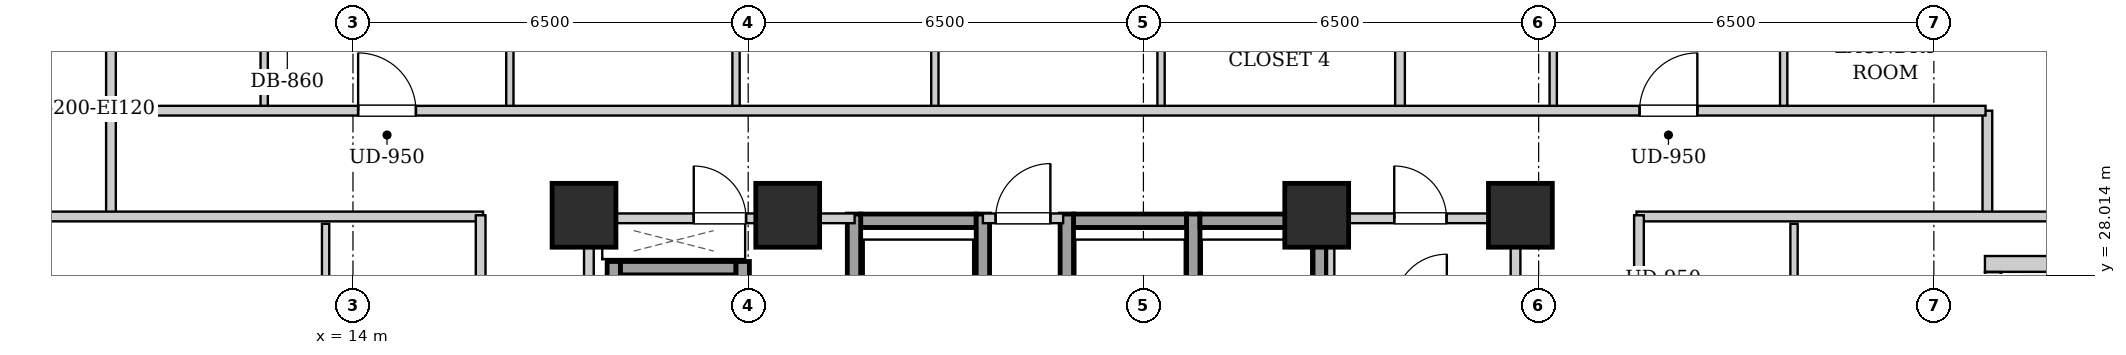
"""IFC4 building model, lengths in metres.
Left out: names, types, materials, properties, quantities, classifications, styles, units other than length and angle.
Written with IfcOpenShell. Run it as: python <this file> out.ifc"""

import sys

from ifc_helpers import new_model, si_unit, direction, frame, frame_2d, origin, origin_2d, place, context, subcontext, project, spatial, rectangle, extrude, element, fill, save


model = new_model("IFC4")
c1 = context("Model", 3, precision=1e-05, world=origin(), true_north=direction((0.0, 1.0)))
c2 = subcontext(c1, "Body", "Model", "MODEL_VIEW")
j1 = project(units=[si_unit("LENGTHUNIT", "METRE"), si_unit("PLANEANGLEUNIT", "RADIAN")], contexts=[c1])
p1 = place(None, origin())
s1 = spatial("IfcSite", under=j1, at=p1, CompositionType="ELEMENT")
p2 = place(p1, origin())
s2 = spatial("IfcBuilding", under=s1, at=p2, CompositionType="ELEMENT")
p3 = place(p2, frame((0.0, 0.0, 116.7)))
s3 = spatial("IfcBuildingStorey", under=s2, at=p3, CompositionType="ELEMENT", Elevation=116.7)
for number, where, z_axis, x_axis in (
    (1, (17.8, 29.0, 0.0), (0.0, 0.0, 1.0), (1.0, 0.0, 0.0)),
    (2, (21.15, 29.0, 0.0), (0.0, 0.0, 1.0), (1.0, 0.0, 0.0)),
    (3, (29.85, 29.0, 0.0), (0.0, 0.0, 1.0), (1.0, 0.0, 0.0)),
    (4, (33.2, 29.0, 0.0), (0.0, 0.0, 1.0), (1.0, 0.0, 0.0)),
):
    element("IfcColumn", number, at=place(p3, frame(where, z_axis=z_axis, x_axis=x_axis)), inside=s3, PredefinedType="COLUMN", context=c2, shape_type="SweptSolid", body=[
        extrude(rectangle(XDim=1.05, YDim=1.05, at=origin_2d()), origin(), (0.0, 0.0, 1.0), 3.2),
    ])
p4 = place(p3, frame((43.24, 28.2, 0.0), z_axis=(0.0, 0.0, 1.0), x_axis=(-1.0, 0.0, 0.0)))
e5 = element("IfcWall", 5, at=p4, inside=s3, PredefinedType="SOLIDWALL", context=c2, shape_type="SweptSolid", body=[
    extrude(rectangle(XDim=2.4, YDim=0.26, at=frame_2d((1.2, 0.0))), origin(), (0.0, 0.0, 1.0), 2.88),
])
p5 = place(p3, frame((40.97, 28.066, 0.0), z_axis=(0.0, 0.0, 1.0), x_axis=(0.0, -1.0, 0.0)))
e6 = element("IfcWall", 6, at=p5, inside=s3, PredefinedType="SOLIDWALL", context=c2, shape_type="SweptSolid", body=[
    extrude(rectangle(XDim=3.332, YDim=0.26, at=frame_2d((1.666, 0.0))), origin(), (0.0, 0.0, 1.0), 2.88),
])
p6 = place(p5, frame((1.116, 0.0, 0.0)))
e7 = element("IfcOpeningElement", 7, at=p6, cuts=e6, PredefinedType="OPENING", context=c2, shape_type="SweptSolid", body=[
    extrude(rectangle(XDim=1.1, YDim=2.0, at=frame_2d((0.55, 1.0))), frame((0.0, 0.14, 0.0), z_axis=(0.0, -1.0, 0.0), x_axis=(1.0, 0.0, 0.0)), (0.0, 0.0, 1.0), 0.28),
])
p7 = place(p5, frame((0.276, 0.0, 0.55)))
e8 = element("IfcOpeningElement", 8, at=p7, cuts=e6, PredefinedType="OPENING", context=c2, shape_type="SweptSolid", body=[
    extrude(rectangle(XDim=0.68, YDim=1.2, at=frame_2d((0.34, 0.6))), frame((0.0, 0.14, 0.0), z_axis=(0.0, -1.0, 0.0), x_axis=(1.0, 0.0, 0.0)), (0.0, 0.0, 1.0), 0.28),
])
p8 = place(p3, frame((22.35, 28.91, 0.0), z_axis=(0.0, 0.0, 1.0), x_axis=(1.0, 0.0, 0.0)))
e9 = element("IfcWall", 9, at=p8, inside=s3, PredefinedType="SHEAR", context=c2, shape_type="SweptSolid", body=[
    extrude(rectangle(XDim=1.9, YDim=0.22, at=frame_2d((0.95, 0.0))), origin(), (0.0, 0.0, 1.0), 2.88),
])
for number, where, z_axis, x_axis in (
    (10, (22.24, 26.58, 0.0), (0.0, 0.0, 1.0), (0.0, 1.0, 0.0)),
    (11, (24.36, 26.58, 0.0), (0.0, 0.0, 1.0), (0.0, 1.0, 0.0)),
):
    element("IfcWall", number, at=place(p3, frame(where, z_axis=z_axis, x_axis=x_axis)), inside=s3, PredefinedType="SHEAR", context=c2, shape_type="SweptSolid", body=[
        extrude(rectangle(XDim=2.44, YDim=0.22, at=frame_2d((1.22, 0.0))), origin(), (0.0, 0.0, 1.0), 2.88),
    ])
p9 = place(p3, frame((25.85, 28.91, 0.0), z_axis=(0.0, 0.0, 1.0), x_axis=(1.0, 0.0, 0.0)))
e12 = element("IfcWall", 12, at=p9, inside=s3, PredefinedType="SHEAR", context=c2, shape_type="SweptSolid", body=[
    extrude(rectangle(XDim=1.86, YDim=0.22, at=frame_2d((0.93, 0.0))), origin(), (0.0, 0.0, 1.0), 2.88),
])
for number, where, z_axis, x_axis in (
    (13, (25.74, 26.58, 0.0), (0.0, 0.0, 1.0), (0.0, 1.0, 0.0)),
    (14, (27.82, 26.58, 0.0), (0.0, 0.0, 1.0), (0.0, 1.0, 0.0)),
):
    element("IfcWall", number, at=place(p3, frame(where, z_axis=z_axis, x_axis=x_axis)), inside=s3, PredefinedType="SHEAR", context=c2, shape_type="SweptSolid", body=[
        extrude(rectangle(XDim=2.44, YDim=0.22, at=frame_2d((1.22, 0.0))), origin(), (0.0, 0.0, 1.0), 2.88),
    ])
p10 = place(p3, frame((27.93, 28.91, 0.0), z_axis=(0.0, 0.0, 1.0), x_axis=(1.0, 0.0, 0.0)))
e15 = element("IfcWall", 15, at=p10, inside=s3, PredefinedType="SHEAR", context=c2, shape_type="SweptSolid", body=[
    extrude(rectangle(XDim=1.86, YDim=0.22, at=frame_2d((0.93, 0.0))), origin(), (0.0, 0.0, 1.0), 2.88),
])
p11 = place(p3, frame((29.9, 26.58, 0.0), z_axis=(0.0, 0.0, 1.0), x_axis=(0.0, 1.0, 0.0)))
e16 = element("IfcWall", 16, at=p11, inside=s3, PredefinedType="SHEAR", context=c2, shape_type="SweptSolid", body=[
    extrude(rectangle(XDim=2.44, YDim=0.22, at=frame_2d((1.22, 0.0))), origin(), (0.0, 0.0, 1.0), 2.88),
])
p12 = place(p3, frame((18.29, 24.1, 0.0), z_axis=(0.0, 0.0, 1.0), x_axis=(0.0, 1.0, 0.0)))
e17 = element("IfcWall", 17, at=p12, inside=s3, PredefinedType="SHEAR", context=c2, shape_type="SweptSolid", body=[
    extrude(rectangle(XDim=4.14, YDim=0.22, at=frame_2d((2.07, 0.0))), origin(), (0.0, 0.0, 1.0), 2.88),
])
p13 = place(p3, frame((18.4, 28.13, 0.0), z_axis=(0.0, 0.0, 1.0), x_axis=(1.0, 0.0, 0.0)))
e18 = element("IfcWall", 18, at=p13, inside=s3, PredefinedType="SHEAR", context=c2, shape_type="SweptSolid", body=[
    extrude(rectangle(XDim=1.9, YDim=0.22, at=frame_2d((0.95, 0.0))), origin(), (0.0, 0.0, 1.0), 2.88),
])
p14 = place(p3, frame((20.41, 26.06, 0.0), z_axis=(0.0, 0.0, 1.0), x_axis=(0.0, 1.0, 0.0)))
e19 = element("IfcWall", 19, at=p14, inside=s3, PredefinedType="SHEAR", context=c2, shape_type="SweptSolid", body=[
    extrude(rectangle(XDim=2.18, YDim=0.22, at=frame_2d((1.09, 0.0))), origin(), (0.0, 0.0, 1.0), 2.88),
])
for number, where, z_axis, x_axis in (
    (20, (17.88, 24.12, 0.0), (0.0, 0.0, 1.0), (0.0, 1.0, 0.0)),
    (21, (33.12, 24.12, 0.0), (0.0, 0.0, 1.0), (0.0, 1.0, 0.0)),
):
    element("IfcWall", number, at=place(p3, frame(where, z_axis=z_axis, x_axis=x_axis)), inside=s3, PredefinedType="PARTITIONING", context=c2, shape_type="SweptSolid", body=[
        extrude(rectangle(XDim=4.76, YDim=0.16, at=frame_2d((2.38, 0.0))), origin(), (0.0, 0.0, 1.0), 2.215),
    ])
p15 = place(p3, frame((24.36, 28.95, 0.0), z_axis=(0.0, 0.0, 1.0), x_axis=(1.0, 0.0, 0.0)))
e22 = element("IfcWall", 22, at=p15, inside=s3, PredefinedType="PARTITIONING", context=c2, shape_type="SweptSolid", body=[
    extrude(rectangle(XDim=1.32, YDim=0.16, at=frame_2d((0.66, 0.0))), origin(), (0.0, 0.0, 1.0), 2.253),
])
p16 = place(p15, frame((0.21, 0.0, 0.0)))
e23 = element("IfcOpeningElement", 23, at=p16, cuts=e22, PredefinedType="OPENING", context=c2, shape_type="SweptSolid", body=[
    extrude(rectangle(XDim=0.9, YDim=2.05, at=frame_2d((0.45, 1.025))), frame((0.0, 0.09, 0.0), z_axis=(0.0, -1.0, 0.0), x_axis=(1.0, 0.0, 0.0)), (0.0, 0.0, 1.0), 0.18),
])
p17 = place(p3, frame((17.96, 28.95, 0.0), z_axis=(0.0, 0.0, 1.0), x_axis=(1.0, 0.0, 0.0)))
e24 = element("IfcWall", 24, at=p17, inside=s3, PredefinedType="PARTITIONING", context=c2, shape_type="SweptSolid", body=[
    extrude(rectangle(XDim=4.29, YDim=0.16, at=frame_2d((2.145, 0.0))), origin(), (0.0, 0.0, 1.0), 2.253),
])
p18 = place(p17, frame((1.645, 0.0, 0.0)))
e25 = element("IfcOpeningElement", 25, at=p18, cuts=e24, PredefinedType="OPENING", context=c2, shape_type="SweptSolid", body=[
    extrude(rectangle(XDim=0.86, YDim=2.05, at=frame_2d((0.43, 1.025))), frame((0.0, 0.09, 0.0), z_axis=(0.0, -1.0, 0.0), x_axis=(1.0, 0.0, 0.0)), (0.0, 0.0, 1.0), 0.18),
])
p19 = place(p3, frame((30.08, 26.18, 0.0), z_axis=(0.0, 0.0, 1.0), x_axis=(0.0, 1.0, 0.0)))
e26 = element("IfcWall", 26, at=p19, inside=s3, PredefinedType="PARTITIONING", context=c2, shape_type="SweptSolid", body=[
    extrude(rectangle(XDim=2.68, YDim=0.12, at=frame_2d((1.34, 0.0))), origin(), (0.0, 0.0, 1.0), 2.88),
])
p20 = place(p3, frame((30.08, 28.95, 0.0), z_axis=(0.0, 0.0, 1.0), x_axis=(1.0, 0.0, 0.0)))
e27 = element("IfcWall", 27, at=p20, inside=s3, PredefinedType="PARTITIONING", context=c2, shape_type="SweptSolid", body=[
    extrude(rectangle(XDim=2.96, YDim=0.16, at=frame_2d((1.48, 0.0))), origin(), (0.0, 0.0, 1.0), 2.88),
])
p21 = place(p20, frame((1.045, 0.0, 0.0)))
e28 = element("IfcOpeningElement", 28, at=p21, cuts=e27, PredefinedType="OPENING", context=c2, shape_type="SweptSolid", body=[
    extrude(rectangle(XDim=0.86, YDim=2.05, at=frame_2d((0.43, 1.025))), frame((0.0, 0.09, 0.0), z_axis=(0.0, -1.0, 0.0), x_axis=(1.0, 0.0, 0.0)), (0.0, 0.0, 1.0), 0.18),
])
for number, where, z_axis, x_axis in (
    (29, (10.02, 28.98, 0.0), (0.0, 0.0, 1.0), (0.0, 1.0, 0.0)),
    (30, (40.88, 28.98, 0.0), (0.0, 0.0, 1.0), (0.0, 1.0, 0.0)),
):
    element("IfcWall", number, at=place(p3, frame(where, z_axis=z_axis, x_axis=x_axis)), inside=s3, PredefinedType="PARTITIONING", context=c2, shape_type="SweptSolid", body=[
        extrude(rectangle(XDim=1.74, YDim=0.16, at=frame_2d((0.87, 0.0))), origin(), (0.0, 0.0, 1.0), 2.88),
    ])
p22 = place(p3, frame((7.78, 28.98, 0.0), z_axis=(0.0, 0.0, 1.0), x_axis=(1.0, 0.0, 0.0)))
e31 = element("IfcWall", 31, at=p22, inside=s3, PredefinedType="PARTITIONING", context=c2, shape_type="SweptSolid", body=[
    extrude(rectangle(XDim=8.36, YDim=0.16, at=frame_2d((4.18, 0.0))), origin(), (0.0, 0.0, 1.0), 2.253),
])
p23 = place(p3, frame((35.11, 28.98, 0.0), z_axis=(0.0, 0.0, 1.0), x_axis=(1.0, 0.0, 0.0)))
e32 = element("IfcWall", 32, at=p23, inside=s3, PredefinedType="PARTITIONING", context=c2, shape_type="SweptSolid", body=[
    extrude(rectangle(XDim=8.01, YDim=0.16, at=frame_2d((4.005, 0.0))), origin(), (0.0, 0.0, 1.0), 2.253),
])
p24 = place(p3, frame((10.02, 30.76, 0.0), z_axis=(0.0, 0.0, 1.0), x_axis=(0.0, 1.0, 0.0)))
e33 = element("IfcWall", 33, at=p24, inside=s3, PredefinedType="PARTITIONING", context=c2, shape_type="SweptSolid", body=[
    extrude(rectangle(XDim=2.91, YDim=0.16, at=frame_2d((1.455, 0.0))), origin(), (0.0, 0.0, 1.0), 2.88),
])
p25 = place(p3, frame((12.54, 30.76, 0.0), z_axis=(0.0, 0.0, 1.0), x_axis=(0.0, 1.0, 0.0)))
e34 = element("IfcWall", 34, at=p25, inside=s3, PredefinedType="PARTITIONING", context=c2, shape_type="SweptSolid", body=[
    extrude(rectangle(XDim=2.85, YDim=0.12, at=frame_2d((1.425, 0.0))), origin(), (0.0, 0.0, 1.0), 2.88),
])
p26 = place(p25, frame((0.995, 0.0, 0.0)))
e35 = element("IfcOpeningElement", 35, at=p26, cuts=e34, PredefinedType="OPENING", context=c2, shape_type="SweptSolid", body=[
    extrude(rectangle(XDim=0.86, YDim=2.05, at=frame_2d((0.43, 1.025))), frame((0.0, 0.07, 0.0), z_axis=(0.0, -1.0, 0.0), x_axis=(1.0, 0.0, 0.0)), (0.0, 0.0, 1.0), 0.14),
])
p27 = place(p3, frame((16.58, 30.76, 0.0), z_axis=(0.0, 0.0, 1.0), x_axis=(0.0, 1.0, 0.0)))
e36 = element("IfcWall", 36, at=p27, inside=s3, PredefinedType="PARTITIONING", context=c2, shape_type="SweptSolid", body=[
    extrude(rectangle(XDim=2.85, YDim=0.12, at=frame_2d((1.425, 0.0))), origin(), (0.0, 0.0, 1.0), 2.88),
])
p28 = place(p27, frame((0.975, 0.0, 0.0)))
e37 = element("IfcOpeningElement", 37, at=p28, cuts=e36, PredefinedType="OPENING", context=c2, shape_type="SweptSolid", body=[
    extrude(rectangle(XDim=0.9, YDim=2.05, at=frame_2d((0.45, 1.025))), frame((0.0, 0.07, 0.0), z_axis=(0.0, -1.0, 0.0), x_axis=(1.0, 0.0, 0.0)), (0.0, 0.0, 1.0), 0.14),
])
p29 = place(p3, frame((20.3, 30.76, 0.0), z_axis=(0.0, 0.0, 1.0), x_axis=(0.0, 1.0, 0.0)))
e38 = element("IfcWall", 38, at=p29, inside=s3, PredefinedType="PARTITIONING", context=c2, shape_type="SweptSolid", body=[
    extrude(rectangle(XDim=2.85, YDim=0.12, at=frame_2d((1.425, 0.0))), origin(), (0.0, 0.0, 1.0), 2.88),
])
p30 = place(p29, frame((0.975, 0.0, 0.0)))
e39 = element("IfcOpeningElement", 39, at=p30, cuts=e38, PredefinedType="OPENING", context=c2, shape_type="SweptSolid", body=[
    extrude(rectangle(XDim=0.9, YDim=2.05, at=frame_2d((0.45, 1.025))), frame((0.0, 0.07, 0.0), z_axis=(0.0, -1.0, 0.0), x_axis=(1.0, 0.0, 0.0)), (0.0, 0.0, 1.0), 0.14),
])
p31 = place(p3, frame((23.57, 30.76, 0.0), z_axis=(0.0, 0.0, 1.0), x_axis=(0.0, 1.0, 0.0)))
e40 = element("IfcWall", 40, at=p31, inside=s3, PredefinedType="PARTITIONING", context=c2, shape_type="SweptSolid", body=[
    extrude(rectangle(XDim=2.85, YDim=0.12, at=frame_2d((1.425, 0.0))), origin(), (0.0, 0.0, 1.0), 2.88),
])
p32 = place(p31, frame((0.975, 0.0, 0.0)))
e41 = element("IfcOpeningElement", 41, at=p32, cuts=e40, PredefinedType="OPENING", context=c2, shape_type="SweptSolid", body=[
    extrude(rectangle(XDim=0.9, YDim=2.05, at=frame_2d((0.45, 1.025))), frame((0.0, 0.07, 0.0), z_axis=(0.0, -1.0, 0.0), x_axis=(1.0, 0.0, 0.0)), (0.0, 0.0, 1.0), 0.14),
])
p33 = place(p3, frame((27.29, 30.76, 0.0), z_axis=(0.0, 0.0, 1.0), x_axis=(0.0, 1.0, 0.0)))
e42 = element("IfcWall", 42, at=p33, inside=s3, PredefinedType="PARTITIONING", context=c2, shape_type="SweptSolid", body=[
    extrude(rectangle(XDim=2.85, YDim=0.12, at=frame_2d((1.425, 0.0))), origin(), (0.0, 0.0, 1.0), 2.88),
])
p34 = place(p33, frame((0.975, 0.0, 0.0)))
e43 = element("IfcOpeningElement", 43, at=p34, cuts=e42, PredefinedType="OPENING", context=c2, shape_type="SweptSolid", body=[
    extrude(rectangle(XDim=0.9, YDim=2.05, at=frame_2d((0.45, 1.025))), frame((0.0, 0.07, 0.0), z_axis=(0.0, -1.0, 0.0), x_axis=(1.0, 0.0, 0.0)), (0.0, 0.0, 1.0), 0.14),
])
p35 = place(p3, frame((31.22, 30.76, 0.0), z_axis=(0.0, 0.0, 1.0), x_axis=(0.0, 1.0, 0.0)))
e44 = element("IfcWall", 44, at=p35, inside=s3, PredefinedType="PARTITIONING", context=c2, shape_type="SweptSolid", body=[
    extrude(rectangle(XDim=12.26, YDim=0.16, at=frame_2d((6.13, 0.0))), origin(), (0.0, 0.0, 1.0), 2.88),
])
p36 = place(p3, frame((33.74, 30.76, 0.0), z_axis=(0.0, 0.0, 1.0), x_axis=(0.0, 1.0, 0.0)))
e45 = element("IfcWall", 45, at=p36, inside=s3, PredefinedType="PARTITIONING", context=c2, shape_type="SweptSolid", body=[
    extrude(rectangle(XDim=2.85, YDim=0.12, at=frame_2d((1.425, 0.0))), origin(), (0.0, 0.0, 1.0), 2.88),
])
p37 = place(p36, frame((0.995, 0.0, 0.0)))
e46 = element("IfcOpeningElement", 46, at=p37, cuts=e45, PredefinedType="OPENING", context=c2, shape_type="SweptSolid", body=[
    extrude(rectangle(XDim=0.86, YDim=2.05, at=frame_2d((0.43, 1.025))), frame((0.0, 0.07, 0.0), z_axis=(0.0, -1.0, 0.0), x_axis=(1.0, 0.0, 0.0)), (0.0, 0.0, 1.0), 0.14),
])
p38 = place(p3, frame((37.53, 30.76, 0.0), z_axis=(0.0, 0.0, 1.0), x_axis=(0.0, 1.0, 0.0)))
e47 = element("IfcWall", 47, at=p38, inside=s3, PredefinedType="PARTITIONING", context=c2, shape_type="SweptSolid", body=[
    extrude(rectangle(XDim=2.85, YDim=0.12, at=frame_2d((1.425, 0.0))), origin(), (0.0, 0.0, 1.0), 2.88),
])
p39 = place(p38, frame((0.975, 0.0, 0.0)))
e48 = element("IfcOpeningElement", 48, at=p39, cuts=e47, PredefinedType="OPENING", context=c2, shape_type="SweptSolid", body=[
    extrude(rectangle(XDim=0.9, YDim=2.05, at=frame_2d((0.45, 1.025))), frame((0.0, 0.07, 0.0), z_axis=(0.0, -1.0, 0.0), x_axis=(1.0, 0.0, 0.0)), (0.0, 0.0, 1.0), 0.14),
])
p40 = place(p3, frame((13.55, 25.052, 0.0), z_axis=(0.0, 0.0, 1.0), x_axis=(0.0, 1.0, 0.0)))
e49 = element("IfcWall", 49, at=p40, inside=s3, PredefinedType="PARTITIONING", context=c2, shape_type="SweptSolid", body=[
    extrude(rectangle(XDim=3.808, YDim=0.12, at=frame_2d((1.904, 0.0))), origin(), (0.0, 0.0, 1.0), 2.88),
])
p41 = place(p40, frame((1.454, 0.0, 0.0)))
e50 = element("IfcOpeningElement", 50, at=p41, cuts=e49, PredefinedType="OPENING", context=c2, shape_type="SweptSolid", body=[
    extrude(rectangle(XDim=0.9, YDim=2.05, at=frame_2d((0.45, 1.025))), frame((0.0, 0.07, 0.0), z_axis=(0.0, -1.0, 0.0), x_axis=(1.0, 0.0, 0.0)), (0.0, 0.0, 1.0), 0.14),
])
p42 = place(p3, frame((37.7, 25.052, 0.0), z_axis=(0.0, 0.0, 1.0), x_axis=(0.0, 1.0, 0.0)))
e51 = element("IfcWall", 51, at=p42, inside=s3, PredefinedType="PARTITIONING", context=c2, shape_type="SweptSolid", body=[
    extrude(rectangle(XDim=3.808, YDim=0.12, at=frame_2d((1.904, 0.0))), origin(), (0.0, 0.0, 1.0), 2.88),
])
p43 = place(p42, frame((1.454, 0.0, 0.0)))
e52 = element("IfcOpeningElement", 52, at=p43, cuts=e51, PredefinedType="OPENING", context=c2, shape_type="SweptSolid", body=[
    extrude(rectangle(XDim=0.9, YDim=2.05, at=frame_2d((0.45, 1.025))), frame((0.0, 0.07, 0.0), z_axis=(0.0, -1.0, 0.0), x_axis=(1.0, 0.0, 0.0)), (0.0, 0.0, 1.0), 0.14),
])
p44 = place(p3, frame((10.05, 30.72, 0.0), z_axis=(0.0, 0.0, 1.0), x_axis=(1.0, 0.0, 0.0)))
e53 = element("IfcWall", 53, at=p44, inside=s3, PredefinedType="PARTITIONING", context=c2, shape_type="SweptSolid", body=[
    extrude(rectangle(XDim=30.8, YDim=0.16, at=frame_2d((15.4, 0.0))), origin(), (0.0, 0.0, 1.0), 2.88),
])
p45 = place(p44, frame((4.035, 0.0, 0.0)))
e54 = element("IfcOpeningElement", 54, at=p45, cuts=e53, PredefinedType="OPENING", context=c2, shape_type="SweptSolid", body=[
    extrude(rectangle(XDim=0.95, YDim=2.1, at=frame_2d((0.475, 1.05))), frame((0.0, 0.09, 0.0), z_axis=(0.0, -1.0, 0.0), x_axis=(1.0, 0.0, 0.0)), (0.0, 0.0, 1.0), 0.18),
])
p46 = place(p44, frame((25.11, 0.0, 0.0)))
e55 = element("IfcOpeningElement", 55, at=p46, cuts=e53, PredefinedType="OPENING", context=c2, shape_type="SweptSolid", body=[
    extrude(rectangle(XDim=0.95, YDim=2.1, at=frame_2d((0.475, 1.05))), frame((0.0, 0.09, 0.0), z_axis=(0.0, -1.0, 0.0), x_axis=(1.0, 0.0, 0.0)), (0.0, 0.0, 1.0), 0.18),
])
p47 = place(p3, frame((16.1, 15.07, 0.0), z_axis=(0.0, 0.0, 1.0), x_axis=(0.0, 1.0, 0.0)))
e56 = element("IfcWall", 56, at=p47, inside=s3, PredefinedType="PARTITIONING", context=c2, shape_type="SweptSolid", body=[
    extrude(rectangle(XDim=13.93, YDim=0.16, at=frame_2d((6.965, 0.0))), origin(), (0.0, 0.0, 1.0), 2.88),
])
p48 = place(p47, frame((4.661, 0.0, 0.0)))
e57 = element("IfcOpeningElement", 57, at=p48, cuts=e56, PredefinedType="OPENING", context=c2, shape_type="SweptSolid", body=[
    extrude(rectangle(XDim=0.95, YDim=2.1, at=frame_2d((0.475, 1.05))), frame((0.0, 0.09, 0.0), z_axis=(0.0, -1.0, 0.0), x_axis=(1.0, 0.0, 0.0)), (0.0, 0.0, 1.0), 0.18),
])
p49 = place(p47, frame((11.411, 0.0, 0.0)))
e58 = element("IfcOpeningElement", 58, at=p49, cuts=e56, PredefinedType="OPENING", context=c2, shape_type="SweptSolid", body=[
    extrude(rectangle(XDim=0.95, YDim=2.1, at=frame_2d((0.475, 1.05))), frame((0.0, 0.09, 0.0), z_axis=(0.0, -1.0, 0.0), x_axis=(1.0, 0.0, 0.0)), (0.0, 0.0, 1.0), 0.18),
])
p50 = place(p3, frame((35.15, 15.07, 0.0), z_axis=(0.0, 0.0, 1.0), x_axis=(0.0, 1.0, 0.0)))
e59 = element("IfcWall", 59, at=p50, inside=s3, PredefinedType="PARTITIONING", context=c2, shape_type="SweptSolid", body=[
    extrude(rectangle(XDim=13.93, YDim=0.16, at=frame_2d((6.965, 0.0))), origin(), (0.0, 0.0, 1.0), 2.88),
])
p51 = place(p50, frame((4.661, 0.0, 0.0)))
e60 = element("IfcOpeningElement", 60, at=p51, cuts=e59, PredefinedType="OPENING", context=c2, shape_type="SweptSolid", body=[
    extrude(rectangle(XDim=0.95, YDim=2.1, at=frame_2d((0.475, 1.05))), frame((0.0, 0.09, 0.0), z_axis=(0.0, -1.0, 0.0), x_axis=(1.0, 0.0, 0.0)), (0.0, 0.0, 1.0), 0.18),
])
p52 = place(p50, frame((11.411, 0.0, 0.0)))
e61 = element("IfcOpeningElement", 61, at=p52, cuts=e59, PredefinedType="OPENING", context=c2, shape_type="SweptSolid", body=[
    extrude(rectangle(XDim=0.95, YDim=2.1, at=frame_2d((0.475, 1.05))), frame((0.0, 0.09, 0.0), z_axis=(0.0, -1.0, 0.0), x_axis=(1.0, 0.0, 0.0)), (0.0, 0.0, 1.0), 0.18),
])
p53 = place(p16, origin())
e62 = element("IfcDoor", 62, at=p53, inside=s3, OperationType="SINGLE_SWING_RIGHT", PredefinedType="DOOR", context=c2, shape_type="SweptSolid", body=[
    extrude(rectangle(XDim=0.9, YDim=2.05, at=frame_2d((0.45, 1.025))), frame((0.0, 0.025, 0.0), z_axis=(0.0, -1.0, 0.0), x_axis=(1.0, 0.0, 0.0)), (0.0, 0.0, 1.0), 0.05),
])
fill(e23, e62)
p54 = place(p18, origin())
e63 = element("IfcDoor", 63, at=p54, inside=s3, OperationType="SINGLE_SWING_LEFT", PredefinedType="DOOR", context=c2, shape_type="SweptSolid", body=[
    extrude(rectangle(XDim=0.86, YDim=2.05, at=frame_2d((0.43, 1.025))), frame((0.0, 0.025, 0.0), z_axis=(0.0, -1.0, 0.0), x_axis=(1.0, 0.0, 0.0)), (0.0, 0.0, 1.0), 0.05),
])
fill(e25, e63)
p55 = place(p21, origin())
e64 = element("IfcDoor", 64, at=p55, inside=s3, OperationType="SINGLE_SWING_LEFT", PredefinedType="DOOR", context=c2, shape_type="SweptSolid", body=[
    extrude(rectangle(XDim=0.86, YDim=2.05, at=frame_2d((0.43, 1.025))), frame((0.0, 0.025, 0.0), z_axis=(0.0, -1.0, 0.0), x_axis=(1.0, 0.0, 0.0)), (0.0, 0.0, 1.0), 0.05),
])
fill(e28, e64)
p56 = place(p45, origin())
e65 = element("IfcDoor", 65, at=p56, inside=s3, OperationType="SINGLE_SWING_LEFT", PredefinedType="DOOR", context=c2, shape_type="SweptSolid", body=[
    extrude(rectangle(XDim=0.95, YDim=2.1, at=frame_2d((0.475, 1.05))), frame((0.0, 0.025, 0.0), z_axis=(0.0, -1.0, 0.0), x_axis=(1.0, 0.0, 0.0)), (0.0, 0.0, 1.0), 0.05),
])
fill(e54, e65)
p57 = place(p46, origin())
e66 = element("IfcDoor", 66, at=p57, inside=s3, OperationType="SINGLE_SWING_RIGHT", PredefinedType="DOOR", context=c2, shape_type="SweptSolid", body=[
    extrude(rectangle(XDim=0.95, YDim=2.1, at=frame_2d((0.475, 1.05))), frame((0.0, 0.025, 0.0), z_axis=(0.0, -1.0, 0.0), x_axis=(1.0, 0.0, 0.0)), (0.0, 0.0, 1.0), 0.05),
])
fill(e55, e66)
save(model, sys.argv[1])
